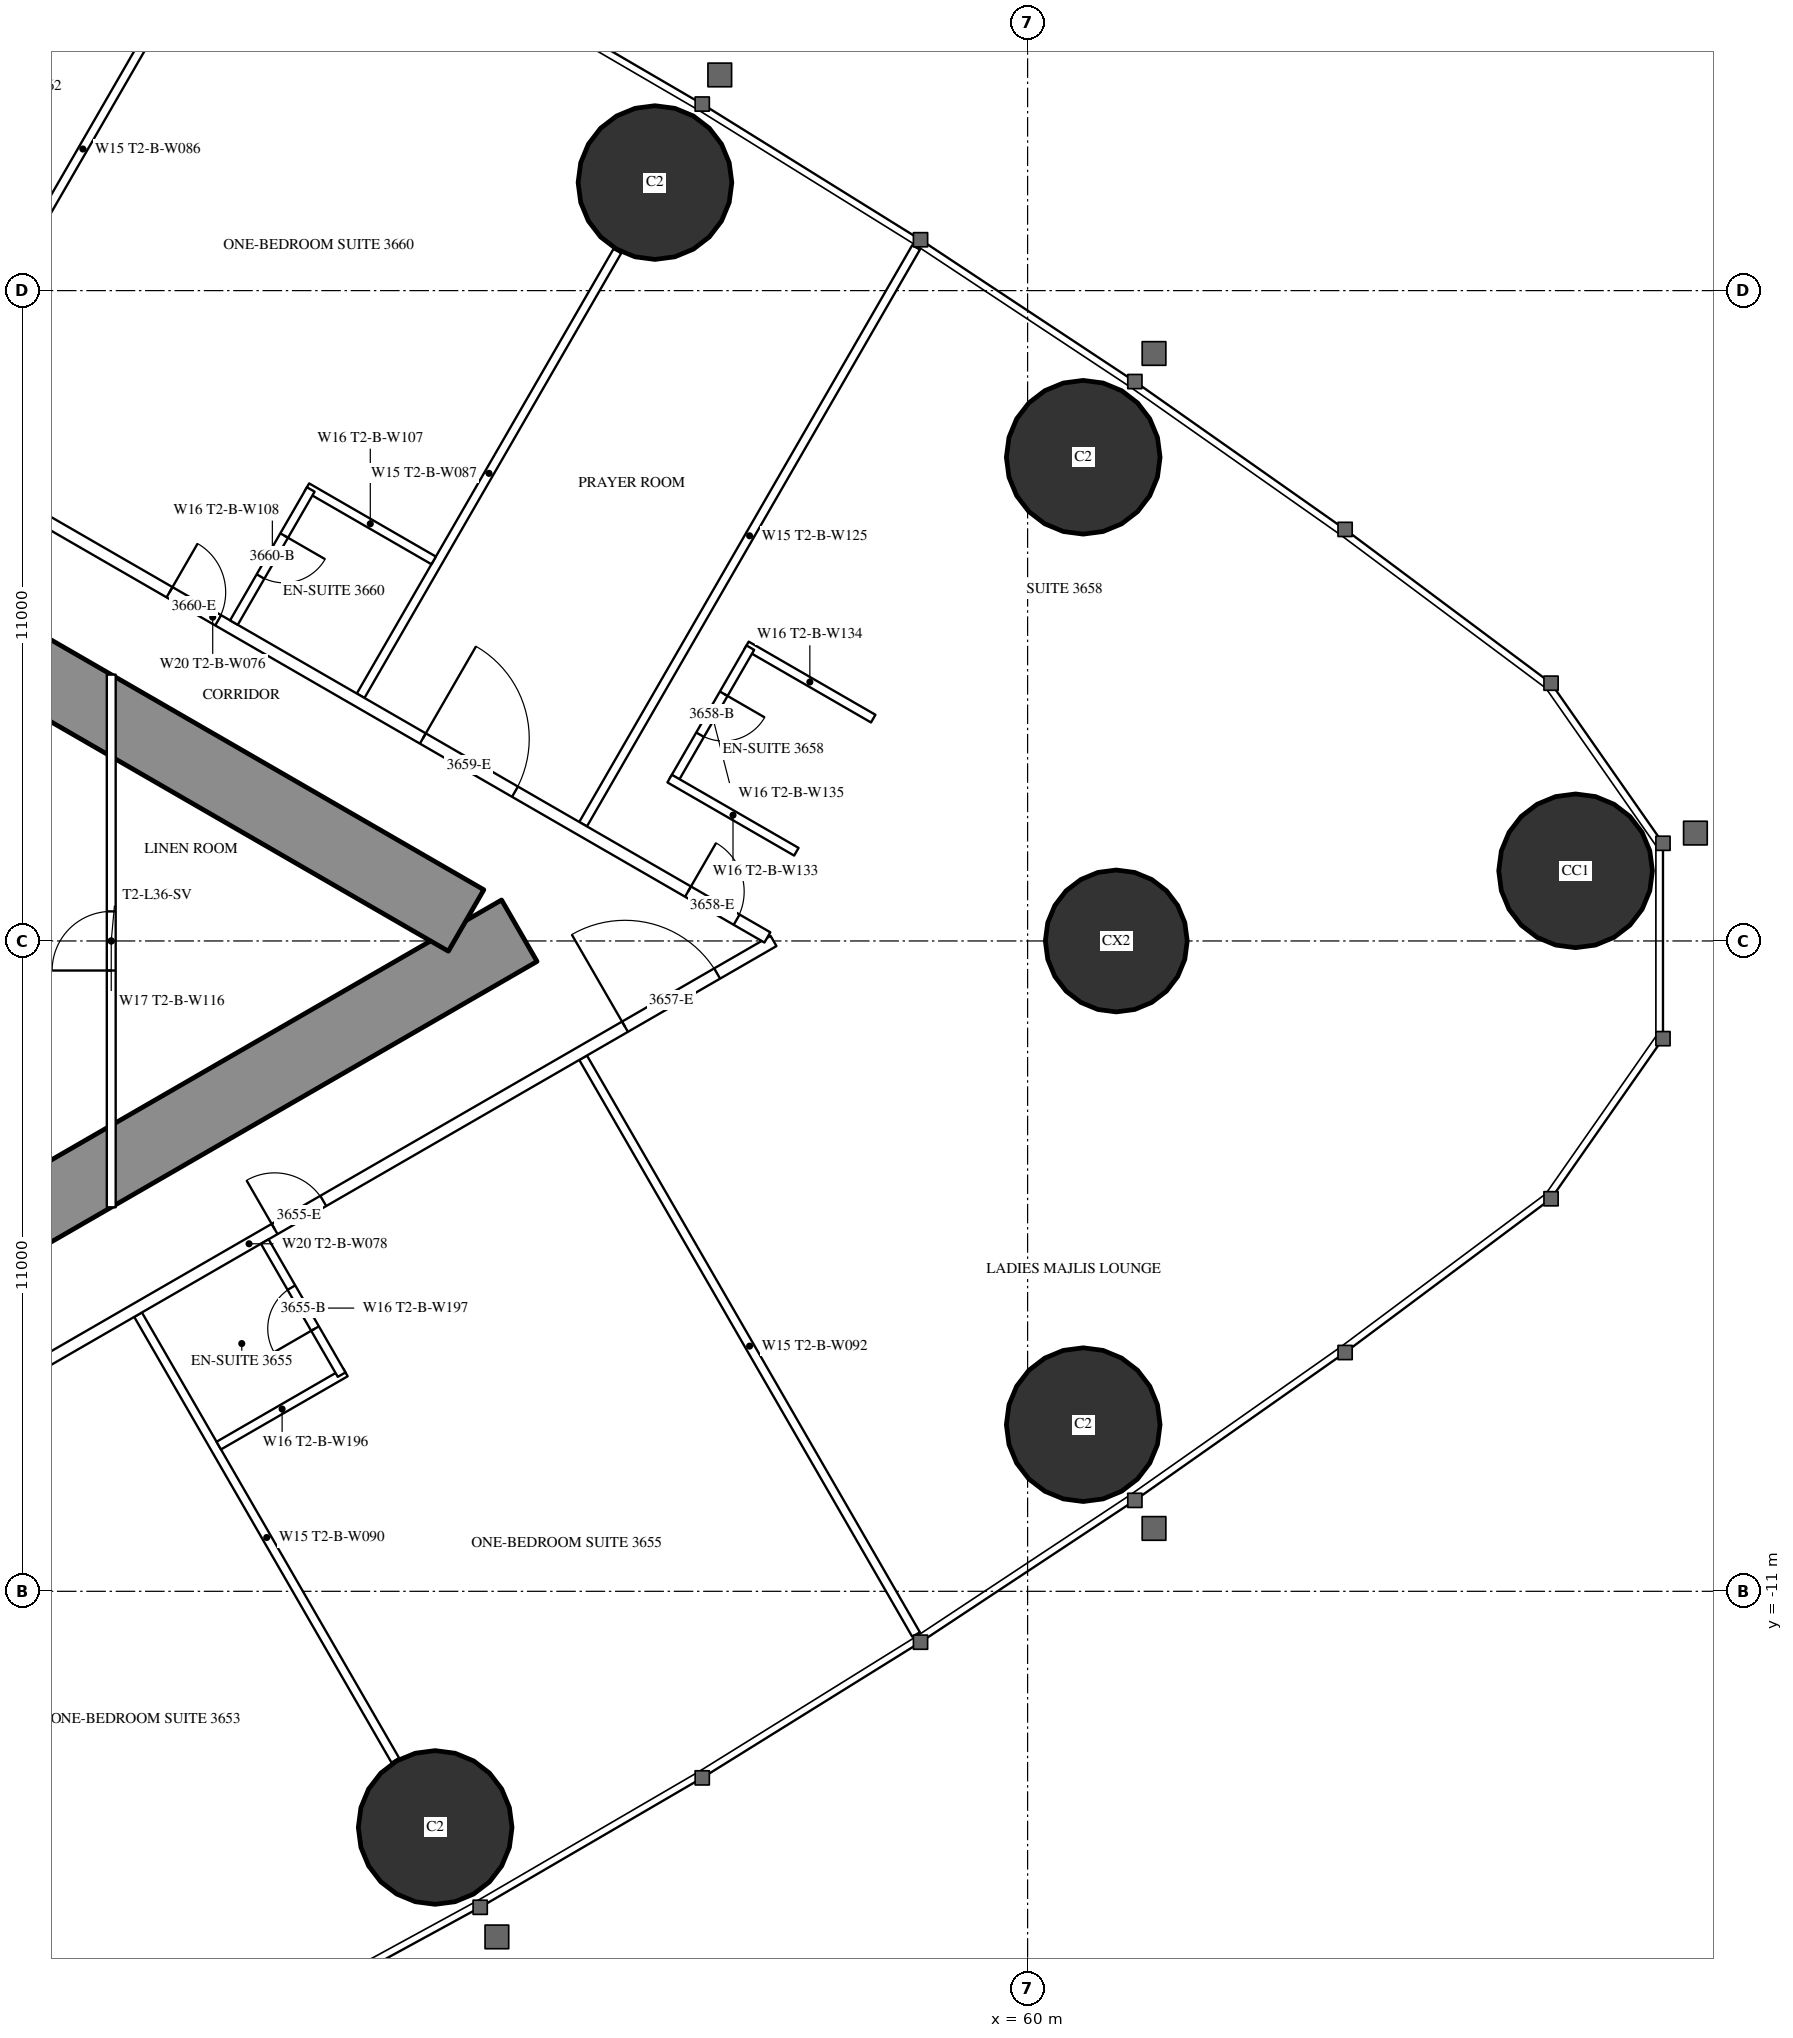
"""IFC4 building model, lengths in metres.
Left out: names, types, materials, properties, quantities, classifications, styles, units other than length and angle.
Written with IfcOpenShell. Run it as: python <this file> out.ifc"""

import sys

from ifc_helpers import new_model, si_unit, direction, frame, frame_2d, origin, origin_2d, place, context, subcontext, project, spatial, rectangle, circle, hollow_circle, extrude, element, fill, save


model = new_model("IFC4")
c1 = context("Model", 3, precision=1e-05, world=origin(), true_north=direction((0.0, 1.0)))
c2 = subcontext(c1, "Body", "Model", "MODEL_VIEW")
j1 = project(units=[si_unit("LENGTHUNIT", "METRE"), si_unit("PLANEANGLEUNIT", "RADIAN")], contexts=[c1])
p1 = place(None, origin())
s1 = spatial("IfcSite", under=j1, at=p1, CompositionType="ELEMENT")
p2 = place(p1, origin())
s2 = spatial("IfcBuilding", under=s1, at=p2, CompositionType="ELEMENT")
p3 = place(p2, frame((0.0, 0.0, 136.1)))
s3 = spatial("IfcBuildingStorey", under=s2, at=p3, CompositionType="ELEMENT", Elevation=136.1)
for number, where, z_axis, x_axis in (
    (1, (69.269, 1.187, 0.0), (0.0, 0.0, 1.0), (1.0, 0.0, 0.0)),
    (2, (60.941, 8.181, 0.0), (0.0, 0.0, 1.0), (1.0, 0.0, 0.0)),
    (3, (53.697, 12.827, 0.0), (0.0, 0.0, 1.0), (1.0, 0.0, 0.0)),
    (4, (49.979, -14.994, 0.0), (0.0, 0.0, 1.0), (1.0, 0.0, 0.0)),
    (5, (60.941, -8.181, 0.0), (0.0, 0.0, 1.0), (1.0, 0.0, 0.0)),
):
    element("IfcColumn", number, at=place(p3, frame(where, z_axis=z_axis, x_axis=x_axis)), inside=s3, PredefinedType="COLUMN", context=c2, shape_type="SweptSolid", body=[
        extrude(hollow_circle(Radius=1.3, WallThickness=0.1, at=origin_2d()), origin(), (0.0, 0.0, 1.0), 3.5),
    ])
p4 = place(p3, frame((61.5, 0.0, 0.0), z_axis=(0.0, 0.0, 1.0), x_axis=(1.0, 0.0, 0.0)))
e6 = element("IfcColumn", 6, at=p4, inside=s3, PredefinedType="COLUMN", context=c2, shape_type="SweptSolid", body=[
    extrude(circle(Radius=1.2, at=origin_2d()), origin(), (0.0, 0.0, 1.0), 3.5),
])
p5 = place(p3, frame((27.2, -13.8, 0.0), z_axis=(0.0, 0.0, 1.0), x_axis=(0.866027159892, 0.499996958321, 0.0)))
e7 = element("IfcWall", 7, at=p5, inside=s3, PredefinedType="SHEAR", context=c2, shape_type="SweptSolid", body=[
    extrude(rectangle(XDim=27.947, YDim=1.2, at=frame_2d((13.973, 0.0))), origin(), (0.0, 0.0, 1.0), 3.5),
])
p6 = place(p5, frame((4.6, 0.0, 0.0)))
e8 = element("IfcOpeningElement", 8, at=p6, cuts=e7, PredefinedType="OPENING", context=c2, shape_type="SweptSolid", body=[
    extrude(rectangle(XDim=1.0, YDim=2.2, at=frame_2d((0.5, 1.1))), frame((0.0, 0.61, 0.0), z_axis=(0.0, -1.0, 0.0), x_axis=(1.0, 0.0, 0.0)), (0.0, 0.0, 1.0), 1.22),
])
p7 = place(p5, frame((13.395, 0.0, 0.0)))
e9 = element("IfcOpeningElement", 9, at=p7, cuts=e7, PredefinedType="OPENING", context=c2, shape_type="SweptSolid", body=[
    extrude(rectangle(XDim=1.8, YDim=2.2, at=frame_2d((0.9, 1.1))), frame((0.0, 0.61, 0.0), z_axis=(0.0, -1.0, 0.0), x_axis=(1.0, 0.0, 0.0)), (0.0, 0.0, 1.0), 1.22),
])
p8 = place(p3, frame((27.2, 13.8, 0.0), z_axis=(0.0, 0.0, 1.0), x_axis=(0.866024515034, -0.500001539357, 0.0)))
e10 = element("IfcWall", 10, at=p8, inside=s3, PredefinedType="SHEAR", context=c2, shape_type="SweptSolid", body=[
    extrude(rectangle(XDim=26.907, YDim=1.2, at=frame_2d((13.454, 0.0))), origin(), (0.0, 0.0, 1.0), 3.5),
])
p9 = place(p8, frame((4.6, 0.0, 0.0)))
e11 = element("IfcOpeningElement", 11, at=p9, cuts=e10, PredefinedType="OPENING", context=c2, shape_type="SweptSolid", body=[
    extrude(rectangle(XDim=1.0, YDim=2.2, at=frame_2d((0.5, 1.1))), frame((0.0, 0.61, 0.0), z_axis=(0.0, -1.0, 0.0), x_axis=(1.0, 0.0, 0.0)), (0.0, 0.0, 1.0), 1.22),
])
p10 = place(p8, frame((13.395, 0.0, 0.0)))
e12 = element("IfcOpeningElement", 12, at=p10, cuts=e10, PredefinedType="OPENING", context=c2, shape_type="SweptSolid", body=[
    extrude(rectangle(XDim=1.8, YDim=2.2, at=frame_2d((0.9, 1.1))), frame((0.0, 0.61, 0.0), z_axis=(0.0, -1.0, 0.0), x_axis=(1.0, 0.0, 0.0)), (0.0, 0.0, 1.0), 1.22),
])
p11 = place(p3, frame((44.954, -6.321, 0.0), z_axis=(0.0, 0.0, 1.0), x_axis=(0.500018676722, -0.866014620505, 0.0)))
e13 = element("IfcWall", 13, at=p11, inside=s3, PredefinedType="PARTITIONING", context=c2, shape_type="SweptSolid", body=[
    extrude(rectangle(XDim=8.704, YDim=0.15, at=frame_2d((4.352, 0.0))), origin(), (0.0, 0.0, 1.0), 2.2),
])
p12 = place(p3, frame((52.481, -1.975, 0.0), z_axis=(0.0, 0.0, 1.0), x_axis=(0.500003867771, -0.866023170714, 0.0)))
e14 = element("IfcWall", 14, at=p12, inside=s3, PredefinedType="PARTITIONING", context=c2, shape_type="SweptSolid", body=[
    extrude(rectangle(XDim=11.265, YDim=0.15, at=frame_2d((5.632, 0.0))), origin(), (0.0, 0.0, 1.0), 3.25),
])
p13 = place(p3, frame((41.19, 8.494, 0.0), z_axis=(0.0, 0.0, 1.0), x_axis=(0.49999258054, 0.866029687369, 0.0)))
e15 = element("IfcWall", 15, at=p13, inside=s3, PredefinedType="PARTITIONING", context=c2, shape_type="SweptSolid", body=[
    extrude(rectangle(XDim=11.318, YDim=0.15, at=frame_2d((5.659, 0.0))), origin(), (0.0, 0.0, 1.0), 3.25),
])
p14 = place(p3, frame((48.719, 4.147, 0.0), z_axis=(0.0, 0.0, 1.0), x_axis=(0.499993328235, 0.866029255696, 0.0)))
e16 = element("IfcWall", 16, at=p14, inside=s3, PredefinedType="PARTITIONING", context=c2, shape_type="SweptSolid", body=[
    extrude(rectangle(XDim=8.686, YDim=0.15, at=frame_2d((4.343, 0.0))), origin(), (0.0, 0.0, 1.0), 2.2),
])
p15 = place(p3, frame((52.481, 1.975, 0.0), z_axis=(0.0, 0.0, 1.0), x_axis=(0.500003867771, 0.866023170714, 0.0)))
e17 = element("IfcWall", 17, at=p15, inside=s3, PredefinedType="PARTITIONING", context=c2, shape_type="SweptSolid", body=[
    extrude(rectangle(XDim=11.265, YDim=0.15, at=frame_2d((5.632, 0.0))), origin(), (0.0, 0.0, 1.0), 3.25),
])
p16 = place(p3, frame((37.96, -10.243, 0.0), z_axis=(0.0, 0.0, 1.0), x_axis=(0.866026429433, 0.499998223521, 0.0)))
e18 = element("IfcWall", 18, at=p16, inside=s3, PredefinedType="PARTITIONING", context=c2, shape_type="SweptSolid", body=[
    extrude(rectangle(XDim=20.487, YDim=0.2, at=frame_2d((10.243, 0.0))), origin(), (0.0, 0.0, 1.0), 3.25),
])
p17 = place(p16, frame((10.743, 0.0, 0.0)))
e19 = element("IfcOpeningElement", 19, at=p17, cuts=e18, PredefinedType="OPENING", context=c2, shape_type="SweptSolid", body=[
    extrude(rectangle(XDim=0.95, YDim=2.2, at=frame_2d((0.475, 1.1))), frame((0.0, 0.11, 0.0), z_axis=(0.0, -1.0, 0.0), x_axis=(1.0, 0.0, 0.0)), (0.0, 0.0, 1.0), 0.22),
])
p18 = place(p16, frame((17.586, 0.0, 0.0)))
e20 = element("IfcOpeningElement", 20, at=p18, cuts=e18, PredefinedType="OPENING", context=c2, shape_type="SweptSolid", body=[
    extrude(rectangle(XDim=1.8, YDim=2.2, at=frame_2d((0.9, 1.1))), frame((0.0, 0.11, 0.0), z_axis=(0.0, -1.0, 0.0), x_axis=(1.0, 0.0, 0.0)), (0.0, 0.0, 1.0), 0.22),
])
p19 = place(p16, frame((0.6, 0.0, 0.0)))
e21 = element("IfcOpeningElement", 21, at=p19, cuts=e18, PredefinedType="OPENING", context=c2, shape_type="SweptSolid", body=[
    extrude(rectangle(XDim=0.95, YDim=2.2, at=frame_2d((0.475, 1.1))), frame((0.0, 0.11, 0.0), z_axis=(0.0, -1.0, 0.0), x_axis=(1.0, 0.0, 0.0)), (0.0, 0.0, 1.0), 0.22),
])
p20 = place(p3, frame((36.834, 10.894, 0.0), z_axis=(0.0, 0.0, 1.0), x_axis=(0.866028157229, -0.499995230863, 0.0)))
e22 = element("IfcWall", 22, at=p20, inside=s3, PredefinedType="PARTITIONING", context=c2, shape_type="SweptSolid", body=[
    extrude(rectangle(XDim=21.667, YDim=0.2, at=frame_2d((10.833, 0.0))), origin(), (0.0, 0.0, 1.0), 3.25),
])
p21 = place(p20, frame((20.117, 0.0, 0.0)))
e23 = element("IfcOpeningElement", 23, at=p21, cuts=e22, PredefinedType="OPENING", context=c2, shape_type="SweptSolid", body=[
    extrude(rectangle(XDim=0.95, YDim=2.2, at=frame_2d((0.475, 1.1))), frame((0.0, 0.11, 0.0), z_axis=(0.0, -1.0, 0.0), x_axis=(1.0, 0.0, 0.0)), (0.0, 0.0, 1.0), 0.22),
])
p22 = place(p20, frame((14.938, 0.0, 0.0)))
e24 = element("IfcOpeningElement", 24, at=p22, cuts=e22, PredefinedType="OPENING", context=c2, shape_type="SweptSolid", body=[
    extrude(rectangle(XDim=1.8, YDim=2.2, at=frame_2d((0.9, 1.1))), frame((0.0, 0.11, 0.0), z_axis=(0.0, -1.0, 0.0), x_axis=(1.0, 0.0, 0.0)), (0.0, 0.0, 1.0), 0.22),
])
p23 = place(p20, frame((9.99, 0.0, 0.0)))
e25 = element("IfcOpeningElement", 25, at=p23, cuts=e22, PredefinedType="OPENING", context=c2, shape_type="SweptSolid", body=[
    extrude(rectangle(XDim=0.95, YDim=2.2, at=frame_2d((0.475, 1.1))), frame((0.0, 0.11, 0.0), z_axis=(0.0, -1.0, 0.0), x_axis=(1.0, 0.0, 0.0)), (0.0, 0.0, 1.0), 0.22),
])
p24 = place(p20, frame((3.35, 0.0, 0.0)))
e26 = element("IfcOpeningElement", 26, at=p24, cuts=e22, PredefinedType="OPENING", context=c2, shape_type="SweptSolid", body=[
    extrude(rectangle(XDim=1.0, YDim=2.2, at=frame_2d((0.5, 1.1))), frame((0.0, 0.11, 0.0), z_axis=(0.0, -1.0, 0.0), x_axis=(1.0, 0.0, 0.0)), (0.0, 0.0, 1.0), 0.22),
])
p25 = place(p3, frame((46.319, -8.535, 0.0), z_axis=(0.0, 0.0, 1.0), x_axis=(0.866006523861, 0.500032699561, 0.0)))
e27 = element("IfcWall", 27, at=p25, inside=s3, PredefinedType="PARTITIONING", context=c2, shape_type="SweptSolid", body=[
    extrude(rectangle(XDim=2.475, YDim=0.15, at=frame_2d((1.237, 0.0))), origin(), (0.0, 0.0, 1.0), 3.25),
])
p26 = place(p3, frame((47.097, -5.084, 0.0), z_axis=(0.0, 0.0, 1.0), x_axis=(0.500006934395, -0.866021400173, 0.0)))
e28 = element("IfcWall", 28, at=p26, inside=s3, PredefinedType="PARTITIONING", context=c2, shape_type="SweptSolid", body=[
    extrude(rectangle(XDim=2.6, YDim=0.15, at=frame_2d((1.3, 0.0))), origin(), (0.0, 0.0, 1.0), 3.25),
])
p27 = place(p26, frame((0.9, 0.0, 0.0)))
e29 = element("IfcOpeningElement", 29, at=p27, cuts=e28, PredefinedType="OPENING", context=c2, shape_type="SweptSolid", body=[
    extrude(rectangle(XDim=0.8, YDim=2.2, at=frame_2d((0.4, 1.1))), frame((0.0, 0.085, 0.0), z_axis=(0.0, -1.0, 0.0), x_axis=(1.0, 0.0, 0.0)), (0.0, 0.0, 1.0), 0.17),
])
p28 = place(p3, frame((55.245, 4.998, 0.0), z_axis=(0.0, 0.0, 1.0), x_axis=(0.866006523861, -0.500032699561, 0.0)))
e30 = element("IfcWall", 30, at=p28, inside=s3, PredefinedType="PARTITIONING", context=c2, shape_type="SweptSolid", body=[
    extrude(rectangle(XDim=2.475, YDim=0.15, at=frame_2d((1.237, 0.0))), origin(), (0.0, 0.0, 1.0), 3.25),
])
p29 = place(p3, frame((54.01, 2.709, 0.0), z_axis=(0.0, 0.0, 1.0), x_axis=(0.500006934395, 0.866021400173, 0.0)))
e31 = element("IfcWall", 31, at=p29, inside=s3, PredefinedType="PARTITIONING", context=c2, shape_type="SweptSolid", body=[
    extrude(rectangle(XDim=2.6, YDim=0.15, at=frame_2d((1.3, 0.0))), origin(), (0.0, 0.0, 1.0), 3.25),
])
p30 = place(p29, frame((0.9, 0.0, 0.0)))
e32 = element("IfcOpeningElement", 32, at=p30, cuts=e31, PredefinedType="OPENING", context=c2, shape_type="SweptSolid", body=[
    extrude(rectangle(XDim=0.8, YDim=2.2, at=frame_2d((0.4, 1.1))), frame((0.0, 0.085, 0.0), z_axis=(0.0, -1.0, 0.0), x_axis=(1.0, 0.0, 0.0)), (0.0, 0.0, 1.0), 0.17),
])
for number, where, z_axis, x_axis in (
    (33, (53.945, 2.747, 0.0), (0.0, 0.0, 1.0), (0.866, -0.5, 0.0)),
    (34, (47.81, 7.674, 0.0), (0.0, 0.0, 1.0), (0.866, -0.5, 0.0)),
):
    element("IfcWall", number, at=place(p3, frame(where, z_axis=z_axis, x_axis=x_axis)), inside=s3, PredefinedType="PARTITIONING", context=c2, shape_type="SweptSolid", body=[
        extrude(rectangle(XDim=2.475, YDim=0.15, at=frame_2d((1.238, 0.0))), origin(), (0.0, 0.0, 1.0), 3.25),
    ])
p31 = place(p3, frame((46.575, 5.385, 0.0), z_axis=(0.0, 0.0, 1.0), x_axis=(0.500006934395, 0.866021400173, 0.0)))
e35 = element("IfcWall", 35, at=p31, inside=s3, PredefinedType="PARTITIONING", context=c2, shape_type="SweptSolid", body=[
    extrude(rectangle(XDim=2.6, YDim=0.15, at=frame_2d((1.3, 0.0))), origin(), (0.0, 0.0, 1.0), 3.25),
])
p32 = place(p31, frame((0.9, 0.0, 0.0)))
e36 = element("IfcOpeningElement", 36, at=p32, cuts=e35, PredefinedType="OPENING", context=c2, shape_type="SweptSolid", body=[
    extrude(rectangle(XDim=0.8, YDim=2.2, at=frame_2d((0.4, 1.1))), frame((0.0, 0.085, 0.0), z_axis=(0.0, -1.0, 0.0), x_axis=(1.0, 0.0, 0.0)), (0.0, 0.0, 1.0), 0.17),
])
p33 = place(p3, frame((44.5, -4.505, 0.0), z_axis=(0.0, 0.0, 1.0), x_axis=(0.0, 1.0, 0.0)))
e37 = element("IfcWall", 37, at=p33, inside=s3, PredefinedType="PARTITIONING", context=c2, shape_type="SweptSolid", body=[
    extrude(rectangle(XDim=9.009, YDim=0.15, at=frame_2d((4.505, 0.0))), origin(), (0.0, 0.0, 1.0), 2.45),
])
p34 = place(p33, frame((4.005, 0.0, 0.0)))
e38 = element("IfcOpeningElement", 38, at=p34, cuts=e37, PredefinedType="OPENING", context=c2, shape_type="SweptSolid", body=[
    extrude(rectangle(XDim=1.0, YDim=2.2, at=frame_2d((0.5, 1.1))), frame((0.0, 0.085, 0.0), z_axis=(0.0, -1.0, 0.0), x_axis=(1.0, 0.0, 0.0)), (0.0, 0.0, 1.0), 0.17),
])
p35 = place(p27, origin())
e39 = element("IfcDoor", 39, at=p35, inside=s3, OperationType="SINGLE_SWING_RIGHT", PredefinedType="DOOR", context=c2, shape_type="SweptSolid", body=[
    extrude(rectangle(XDim=0.8, YDim=2.2, at=frame_2d((0.4, 1.1))), frame((0.0, 0.025, 0.0), z_axis=(0.0, -1.0, 0.0), x_axis=(1.0, 0.0, 0.0)), (0.0, 0.0, 1.0), 0.05),
])
fill(e29, e39)
p36 = place(p17, origin())
e40 = element("IfcDoor", 40, at=p36, inside=s3, OperationType="SINGLE_SWING_LEFT", PredefinedType="DOOR", context=c2, shape_type="SweptSolid", body=[
    extrude(rectangle(XDim=0.95, YDim=2.2, at=frame_2d((0.475, 1.1))), frame((0.0, 0.025, 0.0), z_axis=(0.0, -1.0, 0.0), x_axis=(1.0, 0.0, 0.0)), (0.0, 0.0, 1.0), 0.05),
])
fill(e19, e40)
p37 = place(p18, origin())
e41 = element("IfcDoor", 41, at=p37, inside=s3, OperationType="DOUBLE_DOOR_SINGLE_SWING", PredefinedType="DOOR", context=c2, shape_type="SweptSolid", body=[
    extrude(rectangle(XDim=1.8, YDim=2.2, at=frame_2d((0.9, 1.1))), frame((0.0, 0.025, 0.0), z_axis=(0.0, -1.0, 0.0), x_axis=(1.0, 0.0, 0.0)), (0.0, 0.0, 1.0), 0.05),
])
fill(e20, e41)
p38 = place(p30, origin())
e42 = element("IfcDoor", 42, at=p38, inside=s3, OperationType="SINGLE_SWING_RIGHT", PredefinedType="DOOR", context=c2, shape_type="SweptSolid", body=[
    extrude(rectangle(XDim=0.8, YDim=2.2, at=frame_2d((0.4, 1.1))), frame((0.0, 0.025, 0.0), z_axis=(0.0, -1.0, 0.0), x_axis=(1.0, 0.0, 0.0)), (0.0, 0.0, 1.0), 0.05),
])
fill(e32, e42)
p39 = place(p21, origin())
e43 = element("IfcDoor", 43, at=p39, inside=s3, OperationType="SINGLE_SWING_LEFT", PredefinedType="DOOR", context=c2, shape_type="SweptSolid", body=[
    extrude(rectangle(XDim=0.95, YDim=2.2, at=frame_2d((0.475, 1.1))), frame((0.0, 0.025, 0.0), z_axis=(0.0, -1.0, 0.0), x_axis=(1.0, 0.0, 0.0)), (0.0, 0.0, 1.0), 0.05),
])
fill(e23, e43)
p40 = place(p22, origin())
e44 = element("IfcDoor", 44, at=p40, inside=s3, OperationType="DOUBLE_DOOR_SINGLE_SWING", PredefinedType="DOOR", context=c2, shape_type="SweptSolid", body=[
    extrude(rectangle(XDim=1.8, YDim=2.2, at=frame_2d((0.9, 1.1))), frame((0.0, 0.025, 0.0), z_axis=(0.0, -1.0, 0.0), x_axis=(1.0, 0.0, 0.0)), (0.0, 0.0, 1.0), 0.05),
])
fill(e24, e44)
p41 = place(p32, origin())
e45 = element("IfcDoor", 45, at=p41, inside=s3, OperationType="SINGLE_SWING_RIGHT", PredefinedType="DOOR", context=c2, shape_type="SweptSolid", body=[
    extrude(rectangle(XDim=0.8, YDim=2.2, at=frame_2d((0.4, 1.1))), frame((0.0, 0.025, 0.0), z_axis=(0.0, -1.0, 0.0), x_axis=(1.0, 0.0, 0.0)), (0.0, 0.0, 1.0), 0.05),
])
fill(e36, e45)
p42 = place(p23, origin())
e46 = element("IfcDoor", 46, at=p42, inside=s3, OperationType="SINGLE_SWING_LEFT", PredefinedType="DOOR", context=c2, shape_type="SweptSolid", body=[
    extrude(rectangle(XDim=0.95, YDim=2.2, at=frame_2d((0.475, 1.1))), frame((0.0, 0.025, 0.0), z_axis=(0.0, -1.0, 0.0), x_axis=(1.0, 0.0, 0.0)), (0.0, 0.0, 1.0), 0.05),
])
fill(e25, e46)
p43 = place(p34, origin())
e47 = element("IfcDoor", 47, at=p43, inside=s3, OperationType="SINGLE_SWING_LEFT", PredefinedType="DOOR", context=c2, shape_type="SweptSolid", body=[
    extrude(rectangle(XDim=1.0, YDim=2.2, at=frame_2d((0.5, 1.1))), frame((0.0, 0.025, 0.0), z_axis=(0.0, -1.0, 0.0), x_axis=(1.0, 0.0, 0.0)), (0.0, 0.0, 1.0), 0.05),
])
fill(e38, e47)
save(model, sys.argv[1])
